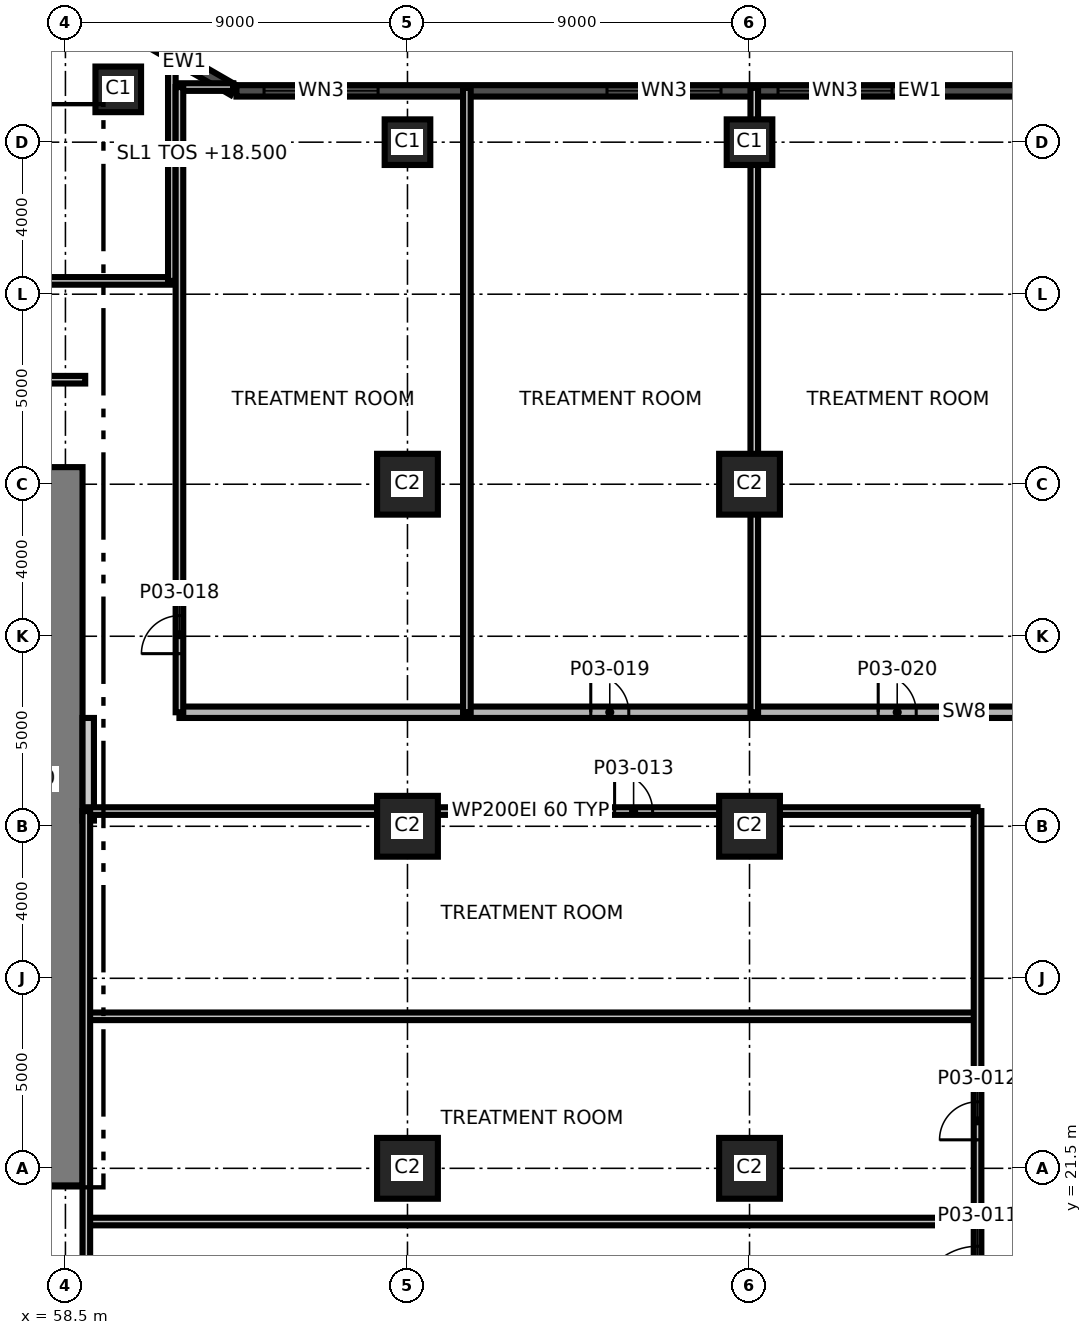
"""IFC4 building model, lengths in metres.
Left out: names, types, materials, properties, quantities, classifications, styles, units other than length and angle.
Written with IfcOpenShell. Run it as: python <this file> out.ifc"""

import sys

from ifc_helpers import new_model, si_unit, direction, frame, frame_2d, origin, origin_2d, place, context, subcontext, project, spatial, rectangle, extrude, element, fill, save


model = new_model("IFC4")
c1 = context("Model", 3, precision=1e-05, world=origin(), true_north=direction((0.0, 1.0)))
c2 = subcontext(c1, "Body", "Model", "MODEL_VIEW")
j1 = project(units=[si_unit("LENGTHUNIT", "METRE"), si_unit("PLANEANGLEUNIT", "RADIAN")], contexts=[c1])
p1 = place(None, origin())
s1 = spatial("IfcSite", under=j1, at=p1, CompositionType="ELEMENT")
p2 = place(p1, origin())
s2 = spatial("IfcBuilding", under=s1, at=p2, CompositionType="ELEMENT")
p3 = place(p2, frame((0.0, 0.0, 18.5)))
s3 = spatial("IfcBuildingStorey", under=s2, at=p3, CompositionType="ELEMENT", Elevation=18.5)
p4 = place(p3, frame((58.5, 21.05, 0.0), z_axis=(0.0, 0.0, 1.0), x_axis=(0.0, 1.0, 0.0)))
e1 = element("IfcWall", 1, at=p4, inside=s3, PredefinedType="SHEAR", context=c2, shape_type="SweptSolid", body=[
    extrude(rectangle(XDim=18.9, YDim=0.9, at=frame_2d((9.45, 0.0))), origin(), (0.0, 0.0, 1.0), 5.0),
])
for number, where, z_axis, x_axis in (
    (2, (67.5, 21.5, 0.0), (0.0, 0.0, 1.0), (1.0, 0.0, 0.0)),
    (3, (76.5, 21.5, 0.0), (0.0, 0.0, 1.0), (1.0, 0.0, 0.0)),
    (4, (67.5, 30.5, 0.0), (0.0, 0.0, 1.0), (1.0, 0.0, 0.0)),
    (5, (76.5, 30.5, 0.0), (0.0, 0.0, 1.0), (1.0, 0.0, 0.0)),
    (6, (67.5, 39.5, 0.0), (0.0, 0.0, 1.0), (1.0, 0.0, 0.0)),
    (7, (76.5, 39.5, 0.0), (0.0, 0.0, 1.0), (1.0, 0.0, 0.0)),
):
    element("IfcColumn", number, at=place(p3, frame(where, z_axis=z_axis, x_axis=x_axis)), inside=s3, PredefinedType="COLUMN", context=c2, shape_type="SweptSolid", body=[
        extrude(rectangle(XDim=1.6, YDim=1.6, at=origin_2d()), origin(), (0.0, 0.0, 1.0), 5.0),
    ])
for number, where, z_axis, x_axis in (
    (8, (67.5, 48.5, 0.0), (0.0, 0.0, 1.0), (1.0, 0.0, 0.0)),
    (9, (76.5, 48.5, 0.0), (0.0, 0.0, 1.0), (1.0, 0.0, 0.0)),
    (10, (59.89, 49.89, 0.0), (0.0, 0.0, 1.0), (1.0, 0.0, 0.0)),
):
    element("IfcColumn", number, at=place(p3, frame(where, z_axis=z_axis, x_axis=x_axis)), inside=s3, PredefinedType="COLUMN", context=c2, shape_type="SweptSolid", body=[
        extrude(rectangle(XDim=1.2, YDim=1.2, at=origin_2d()), origin(), (0.0, 0.0, 1.0), 5.0),
    ])
p5 = place(p3, frame((98.952, 49.85, 0.0), z_axis=(0.0, 0.0, 1.0), x_axis=(-1.0, 0.0, 0.0)))
e11 = element("IfcWall", 11, at=p5, inside=s3, PredefinedType="SOLIDWALL", context=c2, shape_type="SweptSolid", body=[
    extrude(rectangle(XDim=35.952, YDim=0.3, at=frame_2d((17.976, 0.0))), origin(), (0.0, 0.0, 1.0), 4.7),
])
p6 = place(p5, frame((9.702, 0.0, 0.9)))
e12 = element("IfcOpeningElement", 12, at=p6, cuts=e11, PredefinedType="OPENING", context=c2, shape_type="SweptSolid", body=[
    extrude(rectangle(XDim=3.0, YDim=2.4, at=frame_2d((1.5, 1.2))), frame((0.0, 0.16, 0.0), z_axis=(0.0, -1.0, 0.0), x_axis=(1.0, 0.0, 0.0)), (0.0, 0.0, 1.0), 0.32),
])
p7 = place(p5, frame((18.702, 0.0, 0.9)))
e13 = element("IfcOpeningElement", 13, at=p7, cuts=e11, PredefinedType="OPENING", context=c2, shape_type="SweptSolid", body=[
    extrude(rectangle(XDim=3.0, YDim=2.4, at=frame_2d((1.5, 1.2))), frame((0.0, 0.16, 0.0), z_axis=(0.0, -1.0, 0.0), x_axis=(1.0, 0.0, 0.0)), (0.0, 0.0, 1.0), 0.32),
])
p8 = place(p5, frame((23.202, 0.0, 0.9)))
e14 = element("IfcOpeningElement", 14, at=p8, cuts=e11, PredefinedType="OPENING", context=c2, shape_type="SweptSolid", body=[
    extrude(rectangle(XDim=3.0, YDim=2.4, at=frame_2d((1.5, 1.2))), frame((0.0, 0.16, 0.0), z_axis=(0.0, -1.0, 0.0), x_axis=(1.0, 0.0, 0.0)), (0.0, 0.0, 1.0), 0.32),
])
p9 = place(p5, frame((32.226, 0.0, 0.9)))
e15 = element("IfcOpeningElement", 15, at=p9, cuts=e11, PredefinedType="OPENING", context=c2, shape_type="SweptSolid", body=[
    extrude(rectangle(XDim=3.0, YDim=2.4, at=frame_2d((1.5, 1.2))), frame((0.0, 0.16, 0.0), z_axis=(0.0, -1.0, 0.0), x_axis=(1.0, 0.0, 0.0)), (0.0, 0.0, 1.0), 0.32),
])
p10 = place(p3, frame((62.925, 49.87, 0.0), z_axis=(0.0, 0.0, 1.0), x_axis=(-0.866031096941, 0.499990139034, 0.0)))
e16 = element("IfcWall", 16, at=p10, inside=s3, PredefinedType="SOLIDWALL", context=c2, shape_type="SweptSolid", body=[
    extrude(rectangle(XDim=3.0, YDim=0.3, at=frame_2d((1.5, 0.0))), origin(), (0.0, 0.0, 1.0), 4.7),
])
p11 = place(p3, frame((59.1, 30.65, 0.0), z_axis=(0.0, 0.0, 1.0), x_axis=(0.0, 1.0, 0.0)))
e17 = element("IfcWall", 17, at=p11, inside=s3, PredefinedType="PARTITIONING", context=c2, shape_type="SweptSolid", body=[
    extrude(rectangle(XDim=2.7, YDim=0.3, at=frame_2d((1.35, 0.0))), origin(), (0.0, 0.0, 1.0), 4.7),
])
for number, where, z_axis, x_axis in (
    (18, (59.05, 20.1, 0.0), (0.0, 0.0, 1.0), (1.0, 0.0, 0.0)),
    (19, (59.05, 25.5, 0.0), (0.0, 0.0, 1.0), (1.0, 0.0, 0.0)),
):
    element("IfcWall", number, at=place(p3, frame(where, z_axis=z_axis, x_axis=x_axis)), inside=s3, PredefinedType="PARTITIONING", context=c2, shape_type="SweptSolid", body=[
        extrude(rectangle(XDim=23.45, YDim=0.2, at=frame_2d((11.725, 0.0))), origin(), (0.0, 0.0, 1.0), 4.7),
    ])
p12 = place(p3, frame((58.97, 30.9, 0.0), z_axis=(0.0, 0.0, 1.0), x_axis=(1.0, 0.0, 0.0)))
e20 = element("IfcWall", 20, at=p12, inside=s3, PredefinedType="PARTITIONING", context=c2, shape_type="SweptSolid", body=[
    extrude(rectangle(XDim=23.53, YDim=0.2, at=frame_2d((11.765, 0.0))), origin(), (0.0, 0.0, 1.0), 4.7),
])
p13 = place(p12, frame((13.98, 0.0, 0.0)))
e21 = element("IfcOpeningElement", 21, at=p13, cuts=e20, PredefinedType="OPENING", context=c2, shape_type="SweptSolid", body=[
    extrude(rectangle(XDim=1.0, YDim=2.1, at=frame_2d((0.5, 1.05))), frame((0.0, 0.11, 0.0), z_axis=(0.0, -1.0, 0.0), x_axis=(1.0, 0.0, 0.0)), (0.0, 0.0, 1.0), 0.22),
])
p14 = place(p3, frame((61.5, 33.5, 0.0), z_axis=(0.0, 0.0, 1.0), x_axis=(1.0, 0.0, 0.0)))
e22 = element("IfcWall", 22, at=p14, inside=s3, PredefinedType="SHEAR", context=c2, shape_type="SweptSolid", body=[
    extrude(rectangle(XDim=41.3, YDim=0.3, at=frame_2d((20.65, 0.0))), origin(), (0.0, 0.0, 1.0), 4.7),
])
p15 = place(p14, frame((31.95, 0.0, 0.0)))
e23 = element("IfcOpeningElement", 23, at=p15, cuts=e22, PredefinedType="OPENING", context=c2, shape_type="SweptSolid", body=[
    extrude(rectangle(XDim=1.8, YDim=2.1, at=frame_2d((0.9, 1.05))), frame((0.0, 0.16, 0.0), z_axis=(0.0, -1.0, 0.0), x_axis=(1.0, 0.0, 0.0)), (0.0, 0.0, 1.0), 0.32),
])
p16 = place(p14, frame((10.823, 0.0, 0.0)))
e24 = element("IfcOpeningElement", 24, at=p16, cuts=e22, PredefinedType="OPENING", context=c2, shape_type="SweptSolid", body=[
    extrude(rectangle(XDim=1.0, YDim=2.1, at=frame_2d((0.5, 1.05))), frame((0.0, 0.16, 0.0), z_axis=(0.0, -1.0, 0.0), x_axis=(1.0, 0.0, 0.0)), (0.0, 0.0, 1.0), 0.32),
])
p17 = place(p14, frame((18.386, 0.0, 0.0)))
e25 = element("IfcOpeningElement", 25, at=p17, cuts=e22, PredefinedType="OPENING", context=c2, shape_type="SweptSolid", body=[
    extrude(rectangle(XDim=1.0, YDim=2.1, at=frame_2d((0.5, 1.05))), frame((0.0, 0.16, 0.0), z_axis=(0.0, -1.0, 0.0), x_axis=(1.0, 0.0, 0.0)), (0.0, 0.0, 1.0), 0.32),
])
p18 = place(p14, frame((25.948, 0.0, 0.0)))
e26 = element("IfcOpeningElement", 26, at=p18, cuts=e22, PredefinedType="OPENING", context=c2, shape_type="SweptSolid", body=[
    extrude(rectangle(XDim=1.0, YDim=2.1, at=frame_2d((0.5, 1.05))), frame((0.0, 0.16, 0.0), z_axis=(0.0, -1.0, 0.0), x_axis=(1.0, 0.0, 0.0)), (0.0, 0.0, 1.0), 0.32),
])
p19 = place(p14, frame((37.853, 0.0, 0.0)))
e27 = element("IfcOpeningElement", 27, at=p19, cuts=e22, PredefinedType="OPENING", context=c2, shape_type="SweptSolid", body=[
    extrude(rectangle(XDim=1.0, YDim=2.1, at=frame_2d((0.5, 1.05))), frame((0.0, 0.16, 0.0), z_axis=(0.0, -1.0, 0.0), x_axis=(1.0, 0.0, 0.0)), (0.0, 0.0, 1.0), 0.32),
])
p20 = place(p3, frame((43.3, 42.25, 0.0), z_axis=(0.0, 0.0, 1.0), x_axis=(1.0, 0.0, 0.0)))
e28 = element("IfcWall", 28, at=p20, inside=s3, PredefinedType="PARTITIONING", context=c2, shape_type="SweptSolid", body=[
    extrude(rectangle(XDim=15.72, YDim=0.2, at=frame_2d((7.86, 0.0))), origin(), (0.0, 0.0, 1.0), 4.7),
])
p21 = place(p20, frame((5.2, 0.0, 0.0)))
e29 = element("IfcOpeningElement", 29, at=p21, cuts=e28, PredefinedType="OPENING", context=c2, shape_type="SweptSolid", body=[
    extrude(rectangle(XDim=1.0, YDim=2.1, at=frame_2d((0.5, 1.05))), frame((0.0, 0.11, 0.0), z_axis=(0.0, -1.0, 0.0), x_axis=(1.0, 0.0, 0.0)), (0.0, 0.0, 1.0), 0.22),
])
p22 = place(p3, frame((43.3, 44.85, 0.0), z_axis=(0.0, 0.0, 1.0), x_axis=(1.0, 0.0, 0.0)))
e30 = element("IfcWall", 30, at=p22, inside=s3, PredefinedType="PARTITIONING", context=c2, shape_type="SweptSolid", body=[
    extrude(rectangle(XDim=18.2, YDim=0.2, at=frame_2d((9.1, 0.0))), origin(), (0.0, 0.0, 1.0), 4.7),
])
p23 = place(p22, frame((3.377, 0.0, 0.0)))
e31 = element("IfcOpeningElement", 31, at=p23, cuts=e30, PredefinedType="OPENING", context=c2, shape_type="SweptSolid", body=[
    extrude(rectangle(XDim=2.2, YDim=2.4, at=frame_2d((1.1, 1.2))), frame((0.0, 0.11, 0.0), z_axis=(0.0, -1.0, 0.0), x_axis=(1.0, 0.0, 0.0)), (0.0, 0.0, 1.0), 0.22),
])
p24 = place(p3, frame((61.5, 49.95, 0.0), z_axis=(0.0, 0.0, 1.0), x_axis=(1.0, 0.0, 0.0)))
e32 = element("IfcWall", 32, at=p24, inside=s3, PredefinedType="PARTITIONING", context=c2, shape_type="SweptSolid", body=[
    extrude(rectangle(XDim=1.416, YDim=0.2, at=frame_2d((0.708, 0.0))), origin(), (0.0, 0.0, 1.0), 4.7),
])
p25 = place(p3, frame((59.05, 11.07, 0.0), z_axis=(0.0, 0.0, 1.0), x_axis=(0.0, 1.0, 0.0)))
e33 = element("IfcWall", 33, at=p25, inside=s3, PredefinedType="PARTITIONING", context=c2, shape_type="SweptSolid", body=[
    extrude(rectangle(XDim=19.83, YDim=0.2, at=frame_2d((9.915, 0.0))), origin(), (0.0, 0.0, 1.0), 4.7),
])
p26 = place(p3, frame((61.3, 44.85, 0.0), z_axis=(0.0, 0.0, 1.0), x_axis=(0.0, 1.0, 0.0)))
e34 = element("IfcWall", 34, at=p26, inside=s3, PredefinedType="PARTITIONING", context=c2, shape_type="SweptSolid", body=[
    extrude(rectangle(XDim=5.742, YDim=0.2, at=frame_2d((2.871, 0.0))), origin(), (0.0, 0.0, 1.0), 4.7),
])
p27 = place(p3, frame((61.5, 33.5, 0.0), z_axis=(0.0, 0.0, 1.0), x_axis=(0.0, 1.0, 0.0)))
e35 = element("IfcWall", 35, at=p27, inside=s3, PredefinedType="PARTITIONING", context=c2, shape_type="SweptSolid", body=[
    extrude(rectangle(XDim=16.45, YDim=0.2, at=frame_2d((8.225, 0.0))), origin(), (0.0, 0.0, 1.0), 4.7),
])
p28 = place(p27, frame((1.542, 0.0, 0.0)))
e36 = element("IfcOpeningElement", 36, at=p28, cuts=e35, PredefinedType="OPENING", context=c2, shape_type="SweptSolid", body=[
    extrude(rectangle(XDim=1.0, YDim=2.1, at=frame_2d((0.5, 1.05))), frame((0.0, 0.11, 0.0), z_axis=(0.0, -1.0, 0.0), x_axis=(1.0, 0.0, 0.0)), (0.0, 0.0, 1.0), 0.22),
])
for number, where, z_axis, x_axis in (
    (37, (69.063, 33.5, 0.0), (0.0, 0.0, 1.0), (0.0, 1.0, 0.0)),
    (38, (76.625, 33.5, 0.0), (0.0, 0.0, 1.0), (0.0, 1.0, 0.0)),
):
    element("IfcWall", number, at=place(p3, frame(where, z_axis=z_axis, x_axis=x_axis)), inside=s3, PredefinedType="PARTITIONING", context=c2, shape_type="SweptSolid", body=[
        extrude(rectangle(XDim=16.43, YDim=0.2, at=frame_2d((8.215, 0.0))), origin(), (0.0, 0.0, 1.0), 4.7),
    ])
p29 = place(p3, frame((82.5, 11.07, 0.0), z_axis=(0.0, 0.0, 1.0), x_axis=(0.0, 1.0, 0.0)))
e39 = element("IfcWall", 39, at=p29, inside=s3, PredefinedType="PARTITIONING", context=c2, shape_type="SweptSolid", body=[
    extrude(rectangle(XDim=19.83, YDim=0.2, at=frame_2d((9.915, 0.0))), origin(), (0.0, 0.0, 1.0), 4.7),
])
p30 = place(p29, frame((6.78, 0.0, 0.0)))
e40 = element("IfcOpeningElement", 40, at=p30, cuts=e39, PredefinedType="OPENING", context=c2, shape_type="SweptSolid", body=[
    extrude(rectangle(XDim=1.6, YDim=2.1, at=frame_2d((0.8, 1.05))), frame((0.0, 0.11, 0.0), z_axis=(0.0, -1.0, 0.0), x_axis=(1.0, 0.0, 0.0)), (0.0, 0.0, 1.0), 0.22),
])
p31 = place(p29, frame((11.18, 0.0, 0.0)))
e41 = element("IfcOpeningElement", 41, at=p31, cuts=e39, PredefinedType="OPENING", context=c2, shape_type="SweptSolid", body=[
    extrude(rectangle(XDim=1.0, YDim=2.1, at=frame_2d((0.5, 1.05))), frame((0.0, 0.11, 0.0), z_axis=(0.0, -1.0, 0.0), x_axis=(1.0, 0.0, 0.0)), (0.0, 0.0, 1.0), 0.22),
])
p32 = place(p7, origin())
e42 = element("IfcWindow", 42, at=p32, inside=s3, PartitioningType="SINGLE_PANEL", PredefinedType="WINDOW", context=c2, shape_type="SweptSolid", body=[
    extrude(rectangle(XDim=3.0, YDim=2.4, at=frame_2d((1.5, 1.2))), frame((0.0, 0.03, 0.0), z_axis=(0.0, -1.0, 0.0), x_axis=(1.0, 0.0, 0.0)), (0.0, 0.0, 1.0), 0.06),
])
fill(e13, e42)
p33 = place(p8, origin())
e43 = element("IfcWindow", 43, at=p33, inside=s3, PartitioningType="SINGLE_PANEL", PredefinedType="WINDOW", context=c2, shape_type="SweptSolid", body=[
    extrude(rectangle(XDim=3.0, YDim=2.4, at=frame_2d((1.5, 1.2))), frame((0.0, 0.03, 0.0), z_axis=(0.0, -1.0, 0.0), x_axis=(1.0, 0.0, 0.0)), (0.0, 0.0, 1.0), 0.06),
])
fill(e14, e43)
p34 = place(p9, origin())
e44 = element("IfcWindow", 44, at=p34, inside=s3, PartitioningType="SINGLE_PANEL", PredefinedType="WINDOW", context=c2, shape_type="SweptSolid", body=[
    extrude(rectangle(XDim=3.0, YDim=2.4, at=frame_2d((1.5, 1.2))), frame((0.0, 0.03, 0.0), z_axis=(0.0, -1.0, 0.0), x_axis=(1.0, 0.0, 0.0)), (0.0, 0.0, 1.0), 0.06),
])
fill(e15, e44)
p35 = place(p30, origin())
e45 = element("IfcDoor", 45, at=p35, inside=s3, OperationType="SINGLE_SWING_LEFT", PredefinedType="DOOR", context=c2, shape_type="SweptSolid", body=[
    extrude(rectangle(XDim=1.6, YDim=2.1, at=frame_2d((0.8, 1.05))), frame((0.0, 0.025, 0.0), z_axis=(0.0, -1.0, 0.0), x_axis=(1.0, 0.0, 0.0)), (0.0, 0.0, 1.0), 0.05),
])
fill(e40, e45)
p36 = place(p31, origin())
e46 = element("IfcDoor", 46, at=p36, inside=s3, OperationType="SINGLE_SWING_RIGHT", PredefinedType="DOOR", context=c2, shape_type="SweptSolid", body=[
    extrude(rectangle(XDim=1.0, YDim=2.1, at=frame_2d((0.5, 1.05))), frame((0.0, 0.025, 0.0), z_axis=(0.0, -1.0, 0.0), x_axis=(1.0, 0.0, 0.0)), (0.0, 0.0, 1.0), 0.05),
])
fill(e41, e46)
p37 = place(p13, origin())
e47 = element("IfcDoor", 47, at=p37, inside=s3, OperationType="SINGLE_SWING_LEFT", PredefinedType="DOOR", context=c2, shape_type="SweptSolid", body=[
    extrude(rectangle(XDim=1.0, YDim=2.1, at=frame_2d((0.5, 1.05))), frame((0.0, 0.025, 0.0), z_axis=(0.0, -1.0, 0.0), x_axis=(1.0, 0.0, 0.0)), (0.0, 0.0, 1.0), 0.05),
])
fill(e21, e47)
p38 = place(p28, origin())
e48 = element("IfcDoor", 48, at=p38, inside=s3, OperationType="SINGLE_SWING_RIGHT", PredefinedType="DOOR", context=c2, shape_type="SweptSolid", body=[
    extrude(rectangle(XDim=1.0, YDim=2.1, at=frame_2d((0.5, 1.05))), frame((0.0, 0.025, 0.0), z_axis=(0.0, -1.0, 0.0), x_axis=(1.0, 0.0, 0.0)), (0.0, 0.0, 1.0), 0.05),
])
fill(e36, e48)
p39 = place(p16, origin())
e49 = element("IfcDoor", 49, at=p39, inside=s3, OperationType="SINGLE_SWING_LEFT", PredefinedType="DOOR", context=c2, shape_type="SweptSolid", body=[
    extrude(rectangle(XDim=1.0, YDim=2.1, at=frame_2d((0.5, 1.05))), frame((0.0, 0.025, 0.0), z_axis=(0.0, -1.0, 0.0), x_axis=(1.0, 0.0, 0.0)), (0.0, 0.0, 1.0), 0.05),
])
fill(e24, e49)
p40 = place(p17, origin())
e50 = element("IfcDoor", 50, at=p40, inside=s3, OperationType="SINGLE_SWING_RIGHT", PredefinedType="DOOR", context=c2, shape_type="SweptSolid", body=[
    extrude(rectangle(XDim=1.0, YDim=2.1, at=frame_2d((0.5, 1.05))), frame((0.0, 0.025, 0.0), z_axis=(0.0, -1.0, 0.0), x_axis=(1.0, 0.0, 0.0)), (0.0, 0.0, 1.0), 0.05),
])
fill(e25, e50)
save(model, sys.argv[1])
